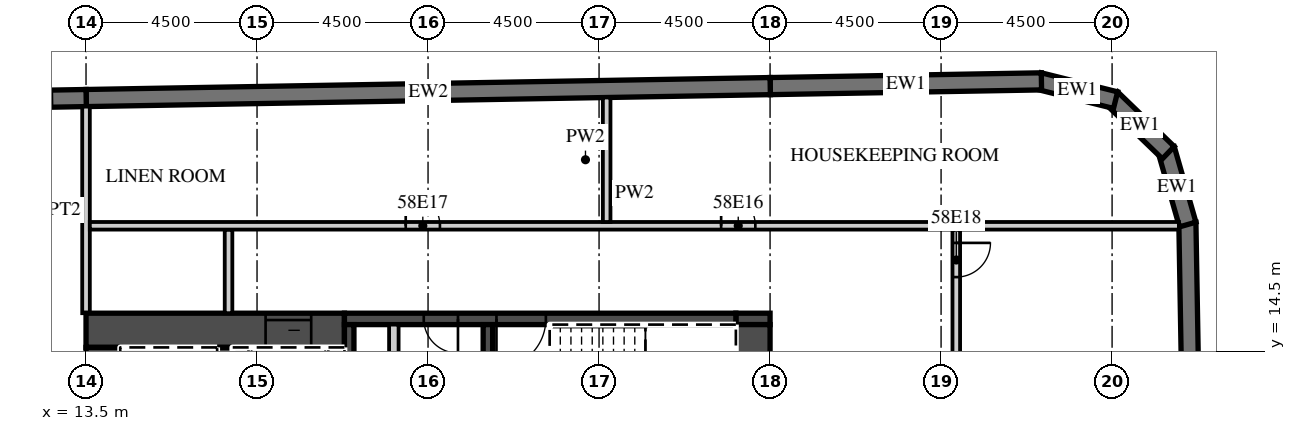
"""IFC4 building model, lengths in metres.
Left out: names, types, materials, properties, quantities, classifications, styles, units other than length and angle.
Written with IfcOpenShell. Run it as: python <this file> out.ifc"""

import sys

from ifc_helpers import new_model, si_unit, direction, frame, frame_2d, origin, place, context, subcontext, project, spatial, polyline, rectangle, outline, extrude, element, fill, save


model = new_model("IFC4")
c1 = context("Model", 3, precision=1e-05, world=origin(), true_north=direction((0.0, 1.0)))
c2 = subcontext(c1, "Body", "Model", "MODEL_VIEW")
j1 = project(units=[si_unit("LENGTHUNIT", "METRE"), si_unit("PLANEANGLEUNIT", "RADIAN")], contexts=[c1])
p1 = place(None, origin())
s1 = spatial("IfcSite", under=j1, at=p1, CompositionType="ELEMENT")
p2 = place(p1, origin())
s2 = spatial("IfcBuilding", under=s1, at=p2, CompositionType="ELEMENT")
p3 = place(p2, frame((0.0, 0.0, 237.5)))
s3 = spatial("IfcBuildingStorey", under=s2, at=p3, CompositionType="ELEMENT", Elevation=237.5)
p4 = place(p3, frame((43.057, -15.103, 0.0), z_axis=(0.0, 0.0, 1.0), x_axis=(-0.017452408953, 0.999847695112, 0.0)))
e1 = element("IfcWall", 1, at=p4, inside=s3, PredefinedType="SOLIDWALL", context=c2, shape_type="SweptSolid", body=[
    extrude(rectangle(XDim=33.0, YDim=0.45, at=frame_2d((16.5, 0.0))), origin(), (0.0, 0.0, 1.0), 3.02),
])
p5 = place(p3, frame((42.49, 17.833, 0.0), z_axis=(0.0, 0.0, 1.0), x_axis=(-0.275546368831, 0.961287781377, 0.0)))
e2 = element("IfcWall", 2, at=p5, inside=s3, PredefinedType="SOLIDWALL", context=c2, shape_type="SweptSolid", body=[
    extrude(outline(polyline([(0.0, -0.225), (2.071, -0.225), (1.95, 0.225), (0.121, 0.225), (0.0, -0.225)])), origin(), (0.0, 0.0, 1.0), 3.02),
])
p6 = place(p3, frame((41.979, 19.724, 0.0), z_axis=(0.0, 0.0, 1.0), x_axis=(-0.719379111448, 0.694617660308, 0.0)))
e3 = element("IfcWall", 3, at=p6, inside=s3, PredefinedType="SOLIDWALL", context=c2, shape_type="SweptSolid", body=[
    extrude(outline(polyline([(0.0, -0.225), (2.071, -0.225), (1.95, 0.225), (0.121, 0.225), (0.0, -0.225)])), origin(), (0.0, 0.0, 1.0), 3.02),
])
p7 = place(p3, frame((40.591, 21.106, 0.0), z_axis=(0.0, 0.0, 1.0), x_axis=(-0.970287979719, 0.241952963225, 0.0)))
e4 = element("IfcWall", 4, at=p7, inside=s3, PredefinedType="SOLIDWALL", context=c2, shape_type="SweptSolid", body=[
    extrude(outline(polyline([(0.0, -0.225), (2.071, -0.225), (1.95, 0.225), (0.121, 0.225), (0.0, -0.225)])), origin(), (0.0, 0.0, 1.0), 3.02),
])
p8 = place(p3, frame((38.641, 21.6, 0.0), z_axis=(0.0, 0.0, 1.0), x_axis=(-0.999847245074, -0.017478172627, 0.0)))
e5 = element("IfcWall", 5, at=p8, inside=s3, PredefinedType="SOLIDWALL", context=c2, shape_type="SweptSolid", body=[
    extrude(rectangle(XDim=7.138, YDim=0.45, at=frame_2d((3.569, 0.0))), origin(), (0.0, 0.0, 1.0), 3.02),
])
p9 = place(p3, frame((31.504, 21.476, 0.0), z_axis=(0.0, 0.0, 1.0), x_axis=(-0.999847677887, -0.017453395744, 0.0)))
e6 = element("IfcWall", 6, at=p9, inside=s3, PredefinedType="SOLIDWALL", context=c2, shape_type="SweptSolid", body=[
    extrude(rectangle(XDim=18.003, YDim=0.45, at=frame_2d((9.001, 0.0))), origin(), (0.0, 0.0, 1.0), 3.02),
])
p10 = place(p3, frame((13.504, 21.161, 0.0), z_axis=(0.0, 0.0, 1.0), x_axis=(-0.999847763257, -0.017448504532, 0.0)))
e7 = element("IfcWall", 7, at=p10, inside=s3, PredefinedType="SOLIDWALL", context=c2, shape_type="SweptSolid", body=[
    extrude(rectangle(XDim=46.859, YDim=0.45, at=frame_2d((23.43, 0.0))), origin(), (0.0, 0.0, 1.0), 3.02),
])
p11 = place(p10, frame((0.9, 0.0, 0.45)))
e8 = element("IfcOpeningElement", 8, at=p11, cuts=e7, PredefinedType="OPENING", context=c2, shape_type="SweptSolid", body=[
    extrude(rectangle(XDim=2.7, YDim=2.25, at=frame_2d((1.35, 1.125))), frame((0.0, 0.235, 0.0), z_axis=(0.0, -1.0, 0.0), x_axis=(1.0, 0.0, 0.0)), (0.0, 0.0, 1.0), 0.47),
])
p12 = place(p10, frame((5.401, 0.0, 0.45)))
e9 = element("IfcOpeningElement", 9, at=p12, cuts=e7, PredefinedType="OPENING", context=c2, shape_type="SweptSolid", body=[
    extrude(rectangle(XDim=2.7, YDim=2.25, at=frame_2d((1.35, 1.125))), frame((0.0, 0.235, 0.0), z_axis=(0.0, -1.0, 0.0), x_axis=(1.0, 0.0, 0.0)), (0.0, 0.0, 1.0), 0.47),
])
p13 = place(p10, frame((9.902, 0.0, 0.45)))
e10 = element("IfcOpeningElement", 10, at=p13, cuts=e7, PredefinedType="OPENING", context=c2, shape_type="SweptSolid", body=[
    extrude(rectangle(XDim=2.7, YDim=2.25, at=frame_2d((1.35, 1.125))), frame((0.0, 0.235, 0.0), z_axis=(0.0, -1.0, 0.0), x_axis=(1.0, 0.0, 0.0)), (0.0, 0.0, 1.0), 0.47),
])
p14 = place(p10, frame((14.402, 0.0, 0.45)))
e11 = element("IfcOpeningElement", 11, at=p14, cuts=e7, PredefinedType="OPENING", context=c2, shape_type="SweptSolid", body=[
    extrude(rectangle(XDim=2.7, YDim=2.25, at=frame_2d((1.35, 1.125))), frame((0.0, 0.235, 0.0), z_axis=(0.0, -1.0, 0.0), x_axis=(1.0, 0.0, 0.0)), (0.0, 0.0, 1.0), 0.47),
])
p15 = place(p10, frame((18.903, 0.0, 0.45)))
e12 = element("IfcOpeningElement", 12, at=p15, cuts=e7, PredefinedType="OPENING", context=c2, shape_type="SweptSolid", body=[
    extrude(rectangle(XDim=2.7, YDim=2.25, at=frame_2d((1.35, 1.125))), frame((0.0, 0.235, 0.0), z_axis=(0.0, -1.0, 0.0), x_axis=(1.0, 0.0, 0.0)), (0.0, 0.0, 1.0), 0.47),
])
p16 = place(p10, frame((23.404, 0.0, 0.45)))
e13 = element("IfcOpeningElement", 13, at=p16, cuts=e7, PredefinedType="OPENING", context=c2, shape_type="SweptSolid", body=[
    extrude(rectangle(XDim=2.7, YDim=2.25, at=frame_2d((1.35, 1.125))), frame((0.0, 0.235, 0.0), z_axis=(0.0, -1.0, 0.0), x_axis=(1.0, 0.0, 0.0)), (0.0, 0.0, 1.0), 0.47),
])
p17 = place(p10, frame((27.904, 0.0, 0.45)))
e14 = element("IfcOpeningElement", 14, at=p17, cuts=e7, PredefinedType="OPENING", context=c2, shape_type="SweptSolid", body=[
    extrude(rectangle(XDim=2.7, YDim=2.25, at=frame_2d((1.35, 1.125))), frame((0.0, 0.235, 0.0), z_axis=(0.0, -1.0, 0.0), x_axis=(1.0, 0.0, 0.0)), (0.0, 0.0, 1.0), 0.47),
])
p18 = place(p10, frame((32.405, 0.0, 0.45)))
e15 = element("IfcOpeningElement", 15, at=p18, cuts=e7, PredefinedType="OPENING", context=c2, shape_type="SweptSolid", body=[
    extrude(rectangle(XDim=2.7, YDim=2.25, at=frame_2d((1.35, 1.125))), frame((0.0, 0.235, 0.0), z_axis=(0.0, -1.0, 0.0), x_axis=(1.0, 0.0, 0.0)), (0.0, 0.0, 1.0), 0.47),
])
p19 = place(p10, frame((36.906, 0.0, 0.45)))
e16 = element("IfcOpeningElement", 16, at=p19, cuts=e7, PredefinedType="OPENING", context=c2, shape_type="SweptSolid", body=[
    extrude(rectangle(XDim=2.7, YDim=2.25, at=frame_2d((1.35, 1.125))), frame((0.0, 0.235, 0.0), z_axis=(0.0, -1.0, 0.0), x_axis=(1.0, 0.0, 0.0)), (0.0, 0.0, 1.0), 0.47),
])
p20 = place(p10, frame((41.406, 0.0, 0.45)))
e17 = element("IfcOpeningElement", 17, at=p20, cuts=e7, PredefinedType="OPENING", context=c2, shape_type="SweptSolid", body=[
    extrude(rectangle(XDim=2.7, YDim=2.25, at=frame_2d((1.35, 1.125))), frame((0.0, 0.235, 0.0), z_axis=(0.0, -1.0, 0.0), x_axis=(1.0, 0.0, 0.0)), (0.0, 0.0, 1.0), 0.47),
])
p21 = place(p3, frame((13.5, 15.5, 0.0), z_axis=(0.0, 0.0, 1.0), x_axis=(0.0, 1.0, 0.0)))
e18 = element("IfcWall", 18, at=p21, inside=s3, PredefinedType="PARTITIONING", context=c2, shape_type="SweptSolid", body=[
    extrude(rectangle(XDim=5.436, YDim=0.2, at=frame_2d((2.718, 0.0))), origin(), (0.0, 0.0, 1.0), 3.02),
])
p22 = place(p3, frame((13.5, 15.05, 0.0), z_axis=(0.0, 0.0, 1.0), x_axis=(1.0, 0.0, 0.0)))
e19 = element("IfcWall", 19, at=p22, inside=s3, PredefinedType="SHEAR", context=c2, shape_type="SweptSolid", body=[
    extrude(rectangle(XDim=6.8, YDim=0.9, at=frame_2d((3.4, 0.0))), origin(), (0.0, 0.0, 1.0), 3.02),
])
p23 = place(p22, frame((4.725, 0.0, 0.0)))
e20 = element("IfcOpeningElement", 20, at=p23, cuts=e19, PredefinedType="OPENING", context=c2, shape_type="SweptSolid", body=[
    extrude(rectangle(XDim=1.2, YDim=2.1, at=frame_2d((0.6, 1.05))), frame((0.0, 0.46, 0.0), z_axis=(0.0, -1.0, 0.0), x_axis=(1.0, 0.0, 0.0)), (0.0, 0.0, 1.0), 0.92),
])
p24 = place(p3, frame((30.6, 15.35, 0.0), z_axis=(0.0, 0.0, 1.0), x_axis=(1.0, 0.0, 0.0)))
e21 = element("IfcWall", 21, at=p24, inside=s3, PredefinedType="SHEAR", context=c2, shape_type="SweptSolid", body=[
    extrude(rectangle(XDim=0.9, YDim=0.3, at=frame_2d((0.45, 0.0))), origin(), (0.0, 0.0, 1.0), 3.02),
])
p25 = place(p3, frame((20.3, 15.35, 0.0), z_axis=(0.0, 0.0, 1.0), x_axis=(1.0, 0.0, 0.0)))
e22 = element("IfcWall", 22, at=p25, inside=s3, PredefinedType="SHEAR", context=c2, shape_type="SweptSolid", body=[
    extrude(rectangle(XDim=10.3, YDim=0.3, at=frame_2d((5.15, 0.0))), origin(), (0.0, 0.0, 1.0), 3.02),
])
p26 = place(p25, frame((4.0, 0.0, 0.0)))
e23 = element("IfcOpeningElement", 23, at=p26, cuts=e22, PredefinedType="OPENING", context=c2, shape_type="SweptSolid", body=[
    extrude(rectangle(XDim=1.3, YDim=2.1, at=frame_2d((0.65, 1.05))), frame((0.0, 0.16, 0.0), z_axis=(0.0, -1.0, 0.0), x_axis=(1.0, 0.0, 0.0)), (0.0, 0.0, 1.0), 0.32),
])
p27 = place(p25, frame((2.087, 0.0, 0.0)))
e24 = element("IfcOpeningElement", 24, at=p27, cuts=e22, PredefinedType="OPENING", context=c2, shape_type="SweptSolid", body=[
    extrude(rectangle(XDim=0.9, YDim=2.1, at=frame_2d((0.45, 1.05))), frame((0.0, 0.16, 0.0), z_axis=(0.0, -1.0, 0.0), x_axis=(1.0, 0.0, 0.0)), (0.0, 0.0, 1.0), 0.32),
])
p28 = place(p3, frame((31.05, 2.4, 0.0), z_axis=(0.0, 0.0, 1.0), x_axis=(0.0, 1.0, 0.0)))
e25 = element("IfcWall", 25, at=p28, inside=s3, PredefinedType="SHEAR", context=c2, shape_type="SweptSolid", body=[
    extrude(rectangle(XDim=12.8, YDim=0.9, at=frame_2d((6.4, 0.0))), origin(), (0.0, 0.0, 1.0), 3.02),
])
p29 = place(p28, frame((0.2, 0.0, 0.0)))
e26 = element("IfcOpeningElement", 26, at=p29, cuts=e25, PredefinedType="OPENING", context=c2, shape_type="SweptSolid", body=[
    extrude(rectangle(XDim=1.1, YDim=2.1, at=frame_2d((0.55, 1.05))), frame((0.0, 0.46, 0.0), z_axis=(0.0, -1.0, 0.0), x_axis=(1.0, 0.0, 0.0)), (0.0, 0.0, 1.0), 0.92),
])
p30 = place(p3, frame((13.95, 2.4, 0.0), z_axis=(0.0, 0.0, 1.0), x_axis=(0.0, 1.0, 0.0)))
e27 = element("IfcWall", 27, at=p30, inside=s3, PredefinedType="SHEAR", context=c2, shape_type="SweptSolid", body=[
    extrude(rectangle(XDim=12.2, YDim=0.9, at=frame_2d((6.1, 0.0))), origin(), (0.0, 0.0, 1.0), 3.02),
])
p31 = place(p3, frame((17.15, 8.8, 0.0), z_axis=(0.0, 0.0, 1.0), x_axis=(0.0, 1.0, 0.0)))
e28 = element("IfcWall", 28, at=p31, inside=s3, PredefinedType="SHEAR", context=c2, shape_type="SweptSolid", body=[
    extrude(rectangle(XDim=5.8, YDim=0.4, at=frame_2d((2.9, 0.0))), origin(), (0.0, 0.0, 1.0), 3.02),
])
for number, where, z_axis, x_axis in (
    (29, (20.425, 11.95, 0.0), (0.0, 0.0, 1.0), (0.0, 1.0, 0.0)),
    (30, (24.075, 11.95, 0.0), (0.0, 0.0, 1.0), (0.0, 1.0, 0.0)),
):
    element("IfcWall", number, at=place(p3, frame(where, z_axis=z_axis, x_axis=x_axis)), inside=s3, PredefinedType="SHEAR", context=c2, shape_type="SweptSolid", body=[
        extrude(rectangle(XDim=3.25, YDim=0.25, at=frame_2d((1.625, 0.0))), origin(), (0.0, 0.0, 1.0), 3.02),
    ])
p32 = place(p3, frame((21.6, 11.95, 0.0), z_axis=(0.0, 0.0, 1.0), x_axis=(0.0, 1.0, 0.0)))
e31 = element("IfcWall", 31, at=p32, inside=s3, PredefinedType="PARTITIONING", context=c2, shape_type="SweptSolid", body=[
    extrude(rectangle(XDim=3.25, YDim=0.25, at=frame_2d((1.625, 0.0))), origin(), (0.0, 0.0, 1.0), 3.02),
])
p33 = place(p3, frame((17.25, 15.5, 0.0), z_axis=(0.0, 0.0, 1.0), x_axis=(0.0, 1.0, 0.0)))
e32 = element("IfcWall", 32, at=p33, inside=s3, PredefinedType="PARTITIONING", context=c2, shape_type="SweptSolid", body=[
    extrude(rectangle(XDim=2.2, YDim=0.2, at=frame_2d((1.1, 0.0))), origin(), (0.0, 0.0, 1.0), 3.02),
])
p34 = place(p3, frame((36.4, 1.75, 0.0), z_axis=(0.0, 0.0, 1.0), x_axis=(0.0, 1.0, 0.0)))
e33 = element("IfcWall", 33, at=p34, inside=s3, PredefinedType="PARTITIONING", context=c2, shape_type="SweptSolid", body=[
    extrude(rectangle(XDim=15.95, YDim=0.2, at=frame_2d((7.975, 0.0))), origin(), (0.0, 0.0, 1.0), 3.02),
])
p35 = place(p34, frame((14.7, 0.0, 0.0)))
e34 = element("IfcOpeningElement", 34, at=p35, cuts=e33, PredefinedType="OPENING", context=c2, shape_type="SweptSolid", body=[
    extrude(rectangle(XDim=0.9, YDim=2.1, at=frame_2d((0.45, 1.05))), frame((0.0, 0.11, 0.0), z_axis=(0.0, -1.0, 0.0), x_axis=(1.0, 0.0, 0.0)), (0.0, 0.0, 1.0), 0.22),
])
p36 = place(p3, frame((13.6, 17.8, 0.0), z_axis=(0.0, 0.0, 1.0), x_axis=(1.0, 0.0, 0.0)))
e35 = element("IfcWall", 35, at=p36, inside=s3, PredefinedType="PARTITIONING", context=c2, shape_type="SweptSolid", body=[
    extrude(rectangle(XDim=28.657, YDim=0.2, at=frame_2d((14.329, 0.0))), origin(), (0.0, 0.0, 1.0), 3.02),
])
p37 = place(p36, frame((16.613, 0.0, 0.0)))
e36 = element("IfcOpeningElement", 36, at=p37, cuts=e35, PredefinedType="OPENING", context=c2, shape_type="SweptSolid", body=[
    extrude(rectangle(XDim=0.9, YDim=2.1, at=frame_2d((0.45, 1.05))), frame((0.0, 0.11, 0.0), z_axis=(0.0, -1.0, 0.0), x_axis=(1.0, 0.0, 0.0)), (0.0, 0.0, 1.0), 0.22),
])
p38 = place(p36, frame((8.312, 0.0, 0.0)))
e37 = element("IfcOpeningElement", 37, at=p38, cuts=e35, PredefinedType="OPENING", context=c2, shape_type="SweptSolid", body=[
    extrude(rectangle(XDim=0.9, YDim=2.1, at=frame_2d((0.45, 1.05))), frame((0.0, 0.11, 0.0), z_axis=(0.0, -1.0, 0.0), x_axis=(1.0, 0.0, 0.0)), (0.0, 0.0, 1.0), 0.22),
])
p39 = place(p3, frame((27.2, 17.9, 0.0), z_axis=(0.0, 0.0, 1.0), x_axis=(0.0, 1.0, 0.0)))
e38 = element("IfcWall", 38, at=p39, inside=s3, PredefinedType="PARTITIONING", context=c2, shape_type="SweptSolid", body=[
    extrude(rectangle(XDim=3.276, YDim=0.2, at=frame_2d((1.638, 0.0))), origin(), (0.0, 0.0, 1.0), 3.02),
])
p40 = place(p11, origin())
e39 = element("IfcWindow", 39, at=p40, inside=s3, PartitioningType="SINGLE_PANEL", PredefinedType="WINDOW", context=c2, shape_type="SweptSolid", body=[
    extrude(rectangle(XDim=2.7, YDim=2.25, at=frame_2d((1.35, 1.125))), frame((0.0, 0.09, 0.0), z_axis=(0.0, -1.0, 0.0), x_axis=(1.0, 0.0, 0.0)), (0.0, 0.0, 1.0), 0.06),
])
fill(e8, e39)
p41 = place(p23, origin())
e40 = element("IfcDoor", 40, at=p41, inside=s3, OperationType="SLIDING_TO_LEFT", PredefinedType="DOOR", context=c2, shape_type="SweptSolid", body=[
    extrude(rectangle(XDim=1.2, YDim=2.1, at=frame_2d((0.6, 1.05))), frame((0.0, 0.025, 0.0), z_axis=(0.0, -1.0, 0.0), x_axis=(1.0, 0.0, 0.0)), (0.0, 0.0, 1.0), 0.05),
])
fill(e20, e40)
p42 = place(p26, origin())
e41 = element("IfcDoor", 41, at=p42, inside=s3, OperationType="SINGLE_SWING_LEFT", PredefinedType="DOOR", context=c2, shape_type="SweptSolid", body=[
    extrude(rectangle(XDim=1.3, YDim=2.1, at=frame_2d((0.65, 1.05))), frame((0.0, 0.025, 0.0), z_axis=(0.0, -1.0, 0.0), x_axis=(1.0, 0.0, 0.0)), (0.0, 0.0, 1.0), 0.05),
])
fill(e23, e41)
p43 = place(p27, origin())
e42 = element("IfcDoor", 42, at=p43, inside=s3, OperationType="SINGLE_SWING_RIGHT", PredefinedType="DOOR", context=c2, shape_type="SweptSolid", body=[
    extrude(rectangle(XDim=0.9, YDim=2.1, at=frame_2d((0.45, 1.05))), frame((0.0, 0.025, 0.0), z_axis=(0.0, -1.0, 0.0), x_axis=(1.0, 0.0, 0.0)), (0.0, 0.0, 1.0), 0.05),
])
fill(e24, e42)
p44 = place(p37, origin())
e43 = element("IfcDoor", 43, at=p44, inside=s3, OperationType="SINGLE_SWING_LEFT", PredefinedType="DOOR", context=c2, shape_type="SweptSolid", body=[
    extrude(rectangle(XDim=0.9, YDim=2.1, at=frame_2d((0.45, 1.05))), frame((0.0, 0.025, 0.0), z_axis=(0.0, -1.0, 0.0), x_axis=(1.0, 0.0, 0.0)), (0.0, 0.0, 1.0), 0.05),
])
fill(e36, e43)
p45 = place(p38, origin())
e44 = element("IfcDoor", 44, at=p45, inside=s3, OperationType="SINGLE_SWING_LEFT", PredefinedType="DOOR", context=c2, shape_type="SweptSolid", body=[
    extrude(rectangle(XDim=0.9, YDim=2.1, at=frame_2d((0.45, 1.05))), frame((0.0, 0.025, 0.0), z_axis=(0.0, -1.0, 0.0), x_axis=(1.0, 0.0, 0.0)), (0.0, 0.0, 1.0), 0.05),
])
fill(e37, e44)
p46 = place(p35, origin())
e45 = element("IfcDoor", 45, at=p46, inside=s3, OperationType="SINGLE_SWING_RIGHT", PredefinedType="DOOR", context=c2, shape_type="SweptSolid", body=[
    extrude(rectangle(XDim=0.9, YDim=2.1, at=frame_2d((0.45, 1.05))), frame((0.0, 0.025, 0.0), z_axis=(0.0, -1.0, 0.0), x_axis=(1.0, 0.0, 0.0)), (0.0, 0.0, 1.0), 0.05),
])
fill(e34, e45)
save(model, sys.argv[1])
